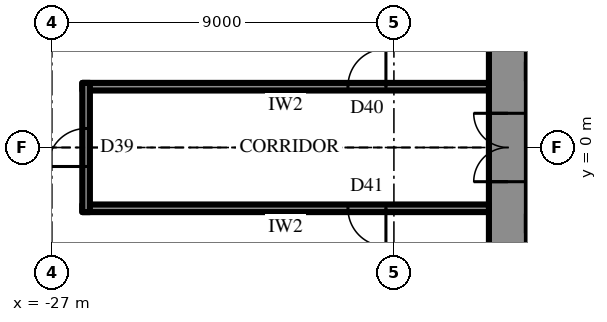
"""IFC4 building model, lengths in metres.
Left out: names, types, materials, properties, quantities, classifications, styles, units other than length and angle.
Written with IfcOpenShell. Run it as: python <this file> out.ifc"""

import sys

from ifc_helpers import new_model, si_unit, direction, frame, frame_2d, origin, place, context, subcontext, project, spatial, rectangle, extrude, element, fill, save


model = new_model("IFC4")
c1 = context("Model", 3, precision=1e-05, world=origin(), true_north=direction((0.0, 1.0)))
c2 = subcontext(c1, "Body", "Model", "MODEL_VIEW")
j1 = project(units=[si_unit("LENGTHUNIT", "METRE"), si_unit("PLANEANGLEUNIT", "RADIAN")], contexts=[c1])
p1 = place(None, origin())
s1 = spatial("IfcSite", under=j1, at=p1, CompositionType="ELEMENT")
p2 = place(p1, origin())
s2 = spatial("IfcBuilding", under=s1, at=p2, CompositionType="ELEMENT")
p3 = place(p2, frame((0.0, 0.0, 291.1)))
s3 = spatial("IfcBuildingStorey", under=s2, at=p3, CompositionType="ELEMENT", Elevation=291.1)
p4 = place(p3, frame((-15.0, 10.7, 0.0), z_axis=(0.0, 0.0, 1.0), x_axis=(0.0, -1.0, 0.0)))
e1 = element("IfcWall", 1, at=p4, inside=s3, PredefinedType="SHEAR", context=c2, shape_type="SweptSolid", body=[
    extrude(rectangle(XDim=21.4, YDim=1.0, at=frame_2d((10.7, 0.0))), origin(), (0.0, 0.0, 1.0), 4.2),
])
p5 = place(p4, frame((9.8, 0.0, 0.0)))
e2 = element("IfcOpeningElement", 2, at=p5, cuts=e1, PredefinedType="OPENING", context=c2, shape_type="SweptSolid", body=[
    extrude(rectangle(XDim=1.8, YDim=2.4, at=frame_2d((0.9, 1.2))), frame((0.0, 0.51, 0.0), z_axis=(0.0, -1.0, 0.0), x_axis=(1.0, 0.0, 0.0)), (0.0, 0.0, 1.0), 1.02),
])
p6 = place(p3, frame((-12.3, -2.0, 0.0), z_axis=(0.0, 0.0, 1.0), x_axis=(-1.0, 0.0, 0.0)))
e3 = element("IfcWall", 3, at=p6, inside=s3, PredefinedType="SHEAR", context=c2, shape_type="SweptSolid", body=[
    extrude(rectangle(XDim=2.2, YDim=0.5, at=frame_2d((1.1, 0.0))), origin(), (0.0, 0.0, 1.0), 4.2),
])
p7 = place(p6, frame((0.8, 0.0, 0.0)))
e4 = element("IfcOpeningElement", 4, at=p7, cuts=e3, PredefinedType="OPENING", context=c2, shape_type="SweptSolid", body=[
    extrude(rectangle(XDim=0.9, YDim=2.2, at=frame_2d((0.45, 1.1))), frame((0.0, 0.26, 0.0), z_axis=(0.0, -1.0, 0.0), x_axis=(1.0, 0.0, 0.0)), (0.0, 0.0, 1.0), 0.52),
])
p8 = place(p3, frame((-15.5, 1.6, 0.0), z_axis=(0.0, 0.0, 1.0), x_axis=(-1.0, 0.0, 0.0)))
e5 = element("IfcWall", 5, at=p8, inside=s3, PredefinedType="PARTITIONING", context=c2, shape_type="SweptSolid", body=[
    extrude(rectangle(XDim=10.7, YDim=0.2, at=frame_2d((5.35, 0.0))), origin(), (0.0, 0.0, 1.0), 4.0),
])
p9 = place(p8, frame((2.71, 0.0, 0.0)))
e6 = element("IfcOpeningElement", 6, at=p9, cuts=e5, PredefinedType="OPENING", context=c2, shape_type="SweptSolid", body=[
    extrude(rectangle(XDim=1.0, YDim=2.2, at=frame_2d((0.5, 1.1))), frame((0.0, 0.11, 0.0), z_axis=(0.0, -1.0, 0.0), x_axis=(1.0, 0.0, 0.0)), (0.0, 0.0, 1.0), 0.22),
])
p10 = place(p3, frame((-15.5, -1.6, 0.0), z_axis=(0.0, 0.0, 1.0), x_axis=(-1.0, 0.0, 0.0)))
e7 = element("IfcWall", 7, at=p10, inside=s3, PredefinedType="PARTITIONING", context=c2, shape_type="SweptSolid", body=[
    extrude(rectangle(XDim=10.7, YDim=0.2, at=frame_2d((5.35, 0.0))), origin(), (0.0, 0.0, 1.0), 4.0),
])
p11 = place(p10, frame((2.71, 0.0, 0.0)))
e8 = element("IfcOpeningElement", 8, at=p11, cuts=e7, PredefinedType="OPENING", context=c2, shape_type="SweptSolid", body=[
    extrude(rectangle(XDim=1.0, YDim=2.2, at=frame_2d((0.5, 1.1))), frame((0.0, 0.11, 0.0), z_axis=(0.0, -1.0, 0.0), x_axis=(1.0, 0.0, 0.0)), (0.0, 0.0, 1.0), 0.22),
])
p12 = place(p3, frame((-26.1, -1.7, 0.0), z_axis=(0.0, 0.0, 1.0), x_axis=(0.0, 1.0, 0.0)))
e9 = element("IfcWall", 9, at=p12, inside=s3, PredefinedType="PARTITIONING", context=c2, shape_type="SweptSolid", body=[
    extrude(rectangle(XDim=3.4, YDim=0.2, at=frame_2d((1.7, 0.0))), origin(), (0.0, 0.0, 1.0), 4.0),
])
p13 = place(p12, frame((1.2, 0.0, 0.0)))
e10 = element("IfcOpeningElement", 10, at=p13, cuts=e9, PredefinedType="OPENING", context=c2, shape_type="SweptSolid", body=[
    extrude(rectangle(XDim=1.0, YDim=2.2, at=frame_2d((0.5, 1.1))), frame((0.0, 0.11, 0.0), z_axis=(0.0, -1.0, 0.0), x_axis=(1.0, 0.0, 0.0)), (0.0, 0.0, 1.0), 0.22),
])
p14 = place(p5, frame((1.8, 0.0, 0.0), z_axis=(0.0, 0.0, 1.0), x_axis=(-1.0, 0.0, 0.0)))
e11 = element("IfcDoor", 11, at=p14, inside=s3, OperationType="DOUBLE_DOOR_SINGLE_SWING", PredefinedType="DOOR", context=c2, shape_type="SweptSolid", body=[
    extrude(rectangle(XDim=1.8, YDim=2.4, at=frame_2d((0.9, 1.2))), frame((0.0, 0.025, 0.0), z_axis=(0.0, -1.0, 0.0), x_axis=(1.0, 0.0, 0.0)), (0.0, 0.0, 1.0), 0.05),
])
fill(e2, e11)
p15 = place(p9, frame((1.0, 0.0, 0.0), z_axis=(0.0, 0.0, 1.0), x_axis=(-1.0, 0.0, 0.0)))
e12 = element("IfcDoor", 12, at=p15, inside=s3, OperationType="SINGLE_SWING_LEFT", PredefinedType="DOOR", context=c2, shape_type="SweptSolid", body=[
    extrude(rectangle(XDim=1.0, YDim=2.2, at=frame_2d((0.5, 1.1))), frame((0.0, 0.025, 0.0), z_axis=(0.0, -1.0, 0.0), x_axis=(1.0, 0.0, 0.0)), (0.0, 0.0, 1.0), 0.05),
])
fill(e6, e12)
p16 = place(p11, origin())
e13 = element("IfcDoor", 13, at=p16, inside=s3, OperationType="SINGLE_SWING_RIGHT", PredefinedType="DOOR", context=c2, shape_type="SweptSolid", body=[
    extrude(rectangle(XDim=1.0, YDim=2.2, at=frame_2d((0.5, 1.1))), frame((0.0, 0.025, 0.0), z_axis=(0.0, -1.0, 0.0), x_axis=(1.0, 0.0, 0.0)), (0.0, 0.0, 1.0), 0.05),
])
fill(e8, e13)
p17 = place(p13, origin())
e14 = element("IfcDoor", 14, at=p17, inside=s3, OperationType="SINGLE_SWING_RIGHT", PredefinedType="DOOR", context=c2, shape_type="SweptSolid", body=[
    extrude(rectangle(XDim=1.0, YDim=2.2, at=frame_2d((0.5, 1.1))), frame((0.0, 0.025, 0.0), z_axis=(0.0, -1.0, 0.0), x_axis=(1.0, 0.0, 0.0)), (0.0, 0.0, 1.0), 0.05),
])
fill(e10, e14)
save(model, sys.argv[1])
